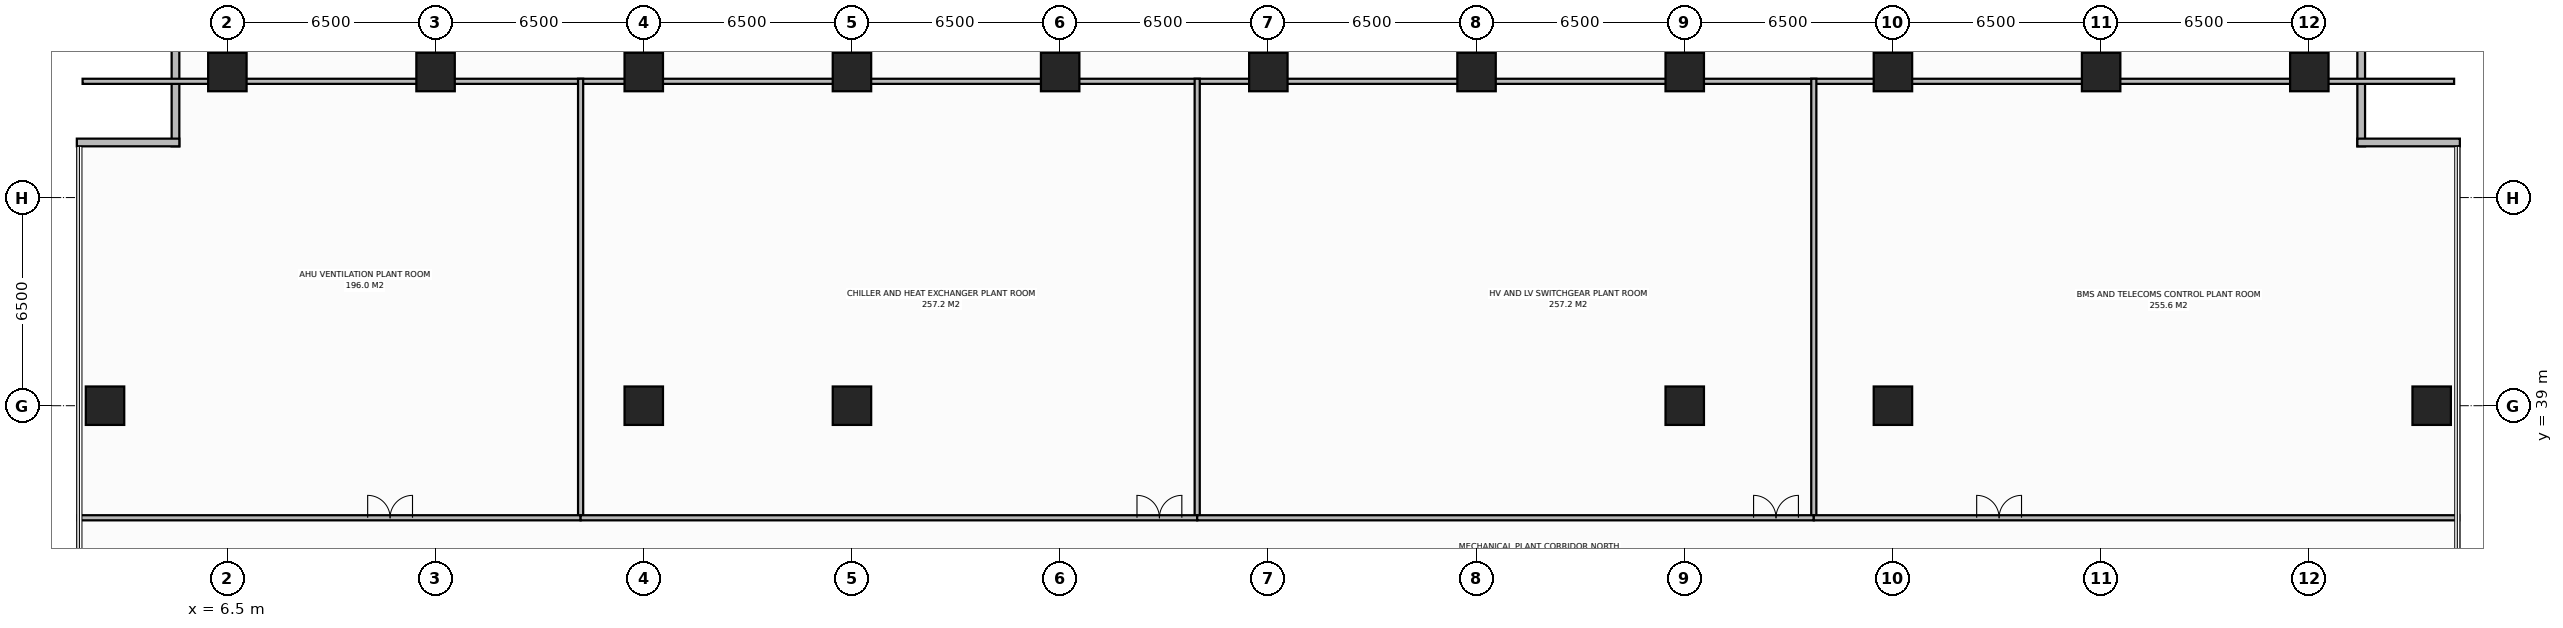
"""IFC4 building model, lengths in metres.
Left out: names, types, materials, properties, quantities, classifications, styles, units other than length and angle.
Written with IfcOpenShell. Run it as: python <this file> out.ifc"""

import sys

from ifc_helpers import new_model, si_unit, direction, frame, frame_2d, origin, origin_2d, place, context, subcontext, project, spatial, rectangle, extrude, element, fill, save


model = new_model("IFC4")
c1 = context("Model", 3, precision=1e-05, world=origin(), true_north=direction((0.0, 1.0)))
c2 = subcontext(c1, "Body", "Model", "MODEL_VIEW")
j1 = project(units=[si_unit("LENGTHUNIT", "METRE"), si_unit("PLANEANGLEUNIT", "RADIAN")], contexts=[c1])
p1 = place(None, origin())
s1 = spatial("IfcSite", under=j1, at=p1, CompositionType="ELEMENT")
p2 = place(p1, origin())
s2 = spatial("IfcBuilding", under=s1, at=p2, CompositionType="ELEMENT")
p3 = place(p2, frame((0.0, 0.0, 139.2)))
s3 = spatial("IfcBuildingStorey", under=s2, at=p3, CompositionType="ELEMENT", Elevation=139.2)
for number, where, z_axis, x_axis in (
    (1, (19.5, 39.0, 0.0), (0.0, 0.0, 1.0), (1.0, 0.0, 0.0)),
    (2, (58.5, 39.0, 0.0), (0.0, 0.0, 1.0), (1.0, 0.0, 0.0)),
    (3, (26.0, 39.0, 0.0), (0.0, 0.0, 1.0), (1.0, 0.0, 0.0)),
    (4, (52.0, 39.0, 0.0), (0.0, 0.0, 1.0), (1.0, 0.0, 0.0)),
    (5, (6.5, 49.42, 0.0), (0.0, 0.0, 1.0), (1.0, 0.0, 0.0)),
    (6, (13.0, 49.42, 0.0), (0.0, 0.0, 1.0), (1.0, 0.0, 0.0)),
    (7, (19.5, 49.42, 0.0), (0.0, 0.0, 1.0), (1.0, 0.0, 0.0)),
    (8, (26.0, 49.42, 0.0), (0.0, 0.0, 1.0), (1.0, 0.0, 0.0)),
    (9, (32.5, 49.42, 0.0), (0.0, 0.0, 1.0), (1.0, 0.0, 0.0)),
    (10, (39.0, 49.42, 0.0), (0.0, 0.0, 1.0), (1.0, 0.0, 0.0)),
    (11, (45.5, 49.42, 0.0), (0.0, 0.0, 1.0), (1.0, 0.0, 0.0)),
    (12, (52.0, 49.42, 0.0), (0.0, 0.0, 1.0), (1.0, 0.0, 0.0)),
    (13, (58.5, 49.42, 0.0), (0.0, 0.0, 1.0), (1.0, 0.0, 0.0)),
    (14, (65.0, 49.42, 0.0), (0.0, 0.0, 1.0), (1.0, 0.0, 0.0)),
    (15, (71.5, 49.42, 0.0), (0.0, 0.0, 1.0), (1.0, 0.0, 0.0)),
    (16, (2.68, 39.0, 0.0), (0.0, 0.0, 1.0), (1.0, 0.0, 0.0)),
    (17, (75.32, 39.0, 0.0), (0.0, 0.0, 1.0), (1.0, 0.0, 0.0)),
):
    element("IfcColumn", number, at=place(p3, frame(where, z_axis=z_axis, x_axis=x_axis)), inside=s3, PredefinedType="COLUMN", context=c2, shape_type="SweptSolid", body=[
        extrude(rectangle(XDim=1.2, YDim=1.2, at=origin_2d()), origin(), (0.0, 0.0, 1.0), 5.0),
    ])
for number, where, z_axis, x_axis in (
    (18, (4.88, 47.1, 0.0), (0.0, 0.0, 1.0), (0.0, 1.0, 0.0)),
    (19, (1.8, 47.22, 0.0), (0.0, 0.0, 1.0), (1.0, 0.0, 0.0)),
    (20, (73.12, 50.3, 0.0), (0.0, 0.0, 1.0), (0.0, -1.0, 0.0)),
    (21, (73.0, 47.22, 0.0), (0.0, 0.0, 1.0), (1.0, 0.0, 0.0)),
):
    element("IfcWall", number, at=place(p3, frame(where, z_axis=z_axis, x_axis=x_axis)), inside=s3, PredefinedType="STANDARD", context=c2, shape_type="SweptSolid", body=[
        extrude(rectangle(XDim=3.2, YDim=0.24, at=frame_2d((1.6, 0.0))), origin(), (0.0, 0.0, 1.0), 4.772),
    ])
p4 = place(p3, frame((1.98, 49.13, 0.0), z_axis=(0.0, 0.0, 1.0), x_axis=(1.0, 0.0, 0.0)))
e22 = element("IfcWall", 22, at=p4, inside=s3, PredefinedType="STANDARD", context=c2, shape_type="SweptSolid", body=[
    extrude(rectangle(XDim=74.04, YDim=0.16, at=frame_2d((37.02, 0.0))), origin(), (0.0, 0.0, 1.0), 4.772),
])
p5 = place(p3, frame((17.528, 35.5, 0.0), z_axis=(0.0, 0.0, 1.0), x_axis=(0.0, 1.0, 0.0)))
e23 = element("IfcWall", 23, at=p5, inside=s3, PredefinedType="STANDARD", context=c2, shape_type="SweptSolid", body=[
    extrude(rectangle(XDim=13.71, YDim=0.16, at=frame_2d((6.855, 0.0))), origin(), (0.0, 0.0, 1.0), 4.772),
])
p6 = place(p3, frame((1.82, 35.5, 0.0), z_axis=(0.0, 0.0, 1.0), x_axis=(1.0, 0.0, 0.0)))
e24 = element("IfcWall", 24, at=p6, inside=s3, PredefinedType="STANDARD", context=c2, shape_type="SweptSolid", body=[
    extrude(rectangle(XDim=15.708, YDim=0.16, at=frame_2d((7.854, 0.0))), origin(), (0.0, 0.0, 1.0), 4.772),
])
p7 = place(p6, frame((9.06, 0.0, 0.0)))
e25 = element("IfcOpeningElement", 25, at=p7, cuts=e24, PredefinedType="OPENING", context=c2, shape_type="SweptSolid", body=[
    extrude(rectangle(XDim=1.4, YDim=2.2, at=frame_2d((0.7, 1.1))), frame((0.0, 0.09, 0.0), z_axis=(0.0, -1.0, 0.0), x_axis=(1.0, 0.0, 0.0)), (0.0, 0.0, 1.0), 0.18),
])
p8 = place(p3, frame((36.779, 35.5, 0.0), z_axis=(0.0, 0.0, 1.0), x_axis=(0.0, 1.0, 0.0)))
e26 = element("IfcWall", 26, at=p8, inside=s3, PredefinedType="STANDARD", context=c2, shape_type="SweptSolid", body=[
    extrude(rectangle(XDim=13.71, YDim=0.16, at=frame_2d((6.855, 0.0))), origin(), (0.0, 0.0, 1.0), 4.772),
])
p9 = place(p3, frame((17.528, 35.5, 0.0), z_axis=(0.0, 0.0, 1.0), x_axis=(1.0, 0.0, 0.0)))
e27 = element("IfcWall", 27, at=p9, inside=s3, PredefinedType="STANDARD", context=c2, shape_type="SweptSolid", body=[
    extrude(rectangle(XDim=19.25, YDim=0.16, at=frame_2d((9.625, 0.0))), origin(), (0.0, 0.0, 1.0), 4.772),
])
p10 = place(p9, frame((17.37, 0.0, 0.0)))
e28 = element("IfcOpeningElement", 28, at=p10, cuts=e27, PredefinedType="OPENING", context=c2, shape_type="SweptSolid", body=[
    extrude(rectangle(XDim=1.4, YDim=2.2, at=frame_2d((0.7, 1.1))), frame((0.0, 0.09, 0.0), z_axis=(0.0, -1.0, 0.0), x_axis=(1.0, 0.0, 0.0)), (0.0, 0.0, 1.0), 0.18),
])
p11 = place(p3, frame((56.029, 35.5, 0.0), z_axis=(0.0, 0.0, 1.0), x_axis=(0.0, 1.0, 0.0)))
e29 = element("IfcWall", 29, at=p11, inside=s3, PredefinedType="STANDARD", context=c2, shape_type="SweptSolid", body=[
    extrude(rectangle(XDim=13.71, YDim=0.16, at=frame_2d((6.855, 0.0))), origin(), (0.0, 0.0, 1.0), 4.772),
])
p12 = place(p3, frame((36.779, 35.5, 0.0), z_axis=(0.0, 0.0, 1.0), x_axis=(1.0, 0.0, 0.0)))
e30 = element("IfcWall", 30, at=p12, inside=s3, PredefinedType="STANDARD", context=c2, shape_type="SweptSolid", body=[
    extrude(rectangle(XDim=19.25, YDim=0.16, at=frame_2d((9.625, 0.0))), origin(), (0.0, 0.0, 1.0), 4.772),
])
p13 = place(p12, frame((17.37, 0.0, 0.0)))
e31 = element("IfcOpeningElement", 31, at=p13, cuts=e30, PredefinedType="OPENING", context=c2, shape_type="SweptSolid", body=[
    extrude(rectangle(XDim=1.4, YDim=2.2, at=frame_2d((0.7, 1.1))), frame((0.0, 0.09, 0.0), z_axis=(0.0, -1.0, 0.0), x_axis=(1.0, 0.0, 0.0)), (0.0, 0.0, 1.0), 0.18),
])
p14 = place(p3, frame((56.029, 35.5, 0.0), z_axis=(0.0, 0.0, 1.0), x_axis=(1.0, 0.0, 0.0)))
e32 = element("IfcWall", 32, at=p14, inside=s3, PredefinedType="STANDARD", context=c2, shape_type="SweptSolid", body=[
    extrude(rectangle(XDim=20.151, YDim=0.16, at=frame_2d((10.075, 0.0))), origin(), (0.0, 0.0, 1.0), 4.772),
])
p15 = place(p14, frame((5.085, 0.0, 0.0)))
e33 = element("IfcOpeningElement", 33, at=p15, cuts=e32, PredefinedType="OPENING", context=c2, shape_type="SweptSolid", body=[
    extrude(rectangle(XDim=1.4, YDim=2.2, at=frame_2d((0.7, 1.1))), frame((0.0, 0.09, 0.0), z_axis=(0.0, -1.0, 0.0), x_axis=(1.0, 0.0, 0.0)), (0.0, 0.0, 1.0), 0.18),
])
p16 = place(p7, origin())
e34 = element("IfcDoor", 34, at=p16, inside=s3, OperationType="DOUBLE_DOOR_SINGLE_SWING", PredefinedType="DOOR", context=c2, shape_type="SweptSolid", body=[
    extrude(rectangle(XDim=1.4, YDim=2.2, at=frame_2d((0.7, 1.1))), frame((0.0, 0.025, 0.0), z_axis=(0.0, -1.0, 0.0), x_axis=(1.0, 0.0, 0.0)), (0.0, 0.0, 1.0), 0.05),
])
fill(e25, e34)
p17 = place(p10, origin())
e35 = element("IfcDoor", 35, at=p17, inside=s3, OperationType="DOUBLE_DOOR_SINGLE_SWING", PredefinedType="DOOR", context=c2, shape_type="SweptSolid", body=[
    extrude(rectangle(XDim=1.4, YDim=2.2, at=frame_2d((0.7, 1.1))), frame((0.0, 0.025, 0.0), z_axis=(0.0, -1.0, 0.0), x_axis=(1.0, 0.0, 0.0)), (0.0, 0.0, 1.0), 0.05),
])
fill(e28, e35)
p18 = place(p13, origin())
e36 = element("IfcDoor", 36, at=p18, inside=s3, OperationType="DOUBLE_DOOR_SINGLE_SWING", PredefinedType="DOOR", context=c2, shape_type="SweptSolid", body=[
    extrude(rectangle(XDim=1.4, YDim=2.2, at=frame_2d((0.7, 1.1))), frame((0.0, 0.025, 0.0), z_axis=(0.0, -1.0, 0.0), x_axis=(1.0, 0.0, 0.0)), (0.0, 0.0, 1.0), 0.05),
])
fill(e31, e36)
p19 = place(p15, origin())
e37 = element("IfcDoor", 37, at=p19, inside=s3, OperationType="DOUBLE_DOOR_SINGLE_SWING", PredefinedType="DOOR", context=c2, shape_type="SweptSolid", body=[
    extrude(rectangle(XDim=1.4, YDim=2.2, at=frame_2d((0.7, 1.1))), frame((0.0, 0.025, 0.0), z_axis=(0.0, -1.0, 0.0), x_axis=(1.0, 0.0, 0.0)), (0.0, 0.0, 1.0), 0.05),
])
fill(e33, e37)
save(model, sys.argv[1])
